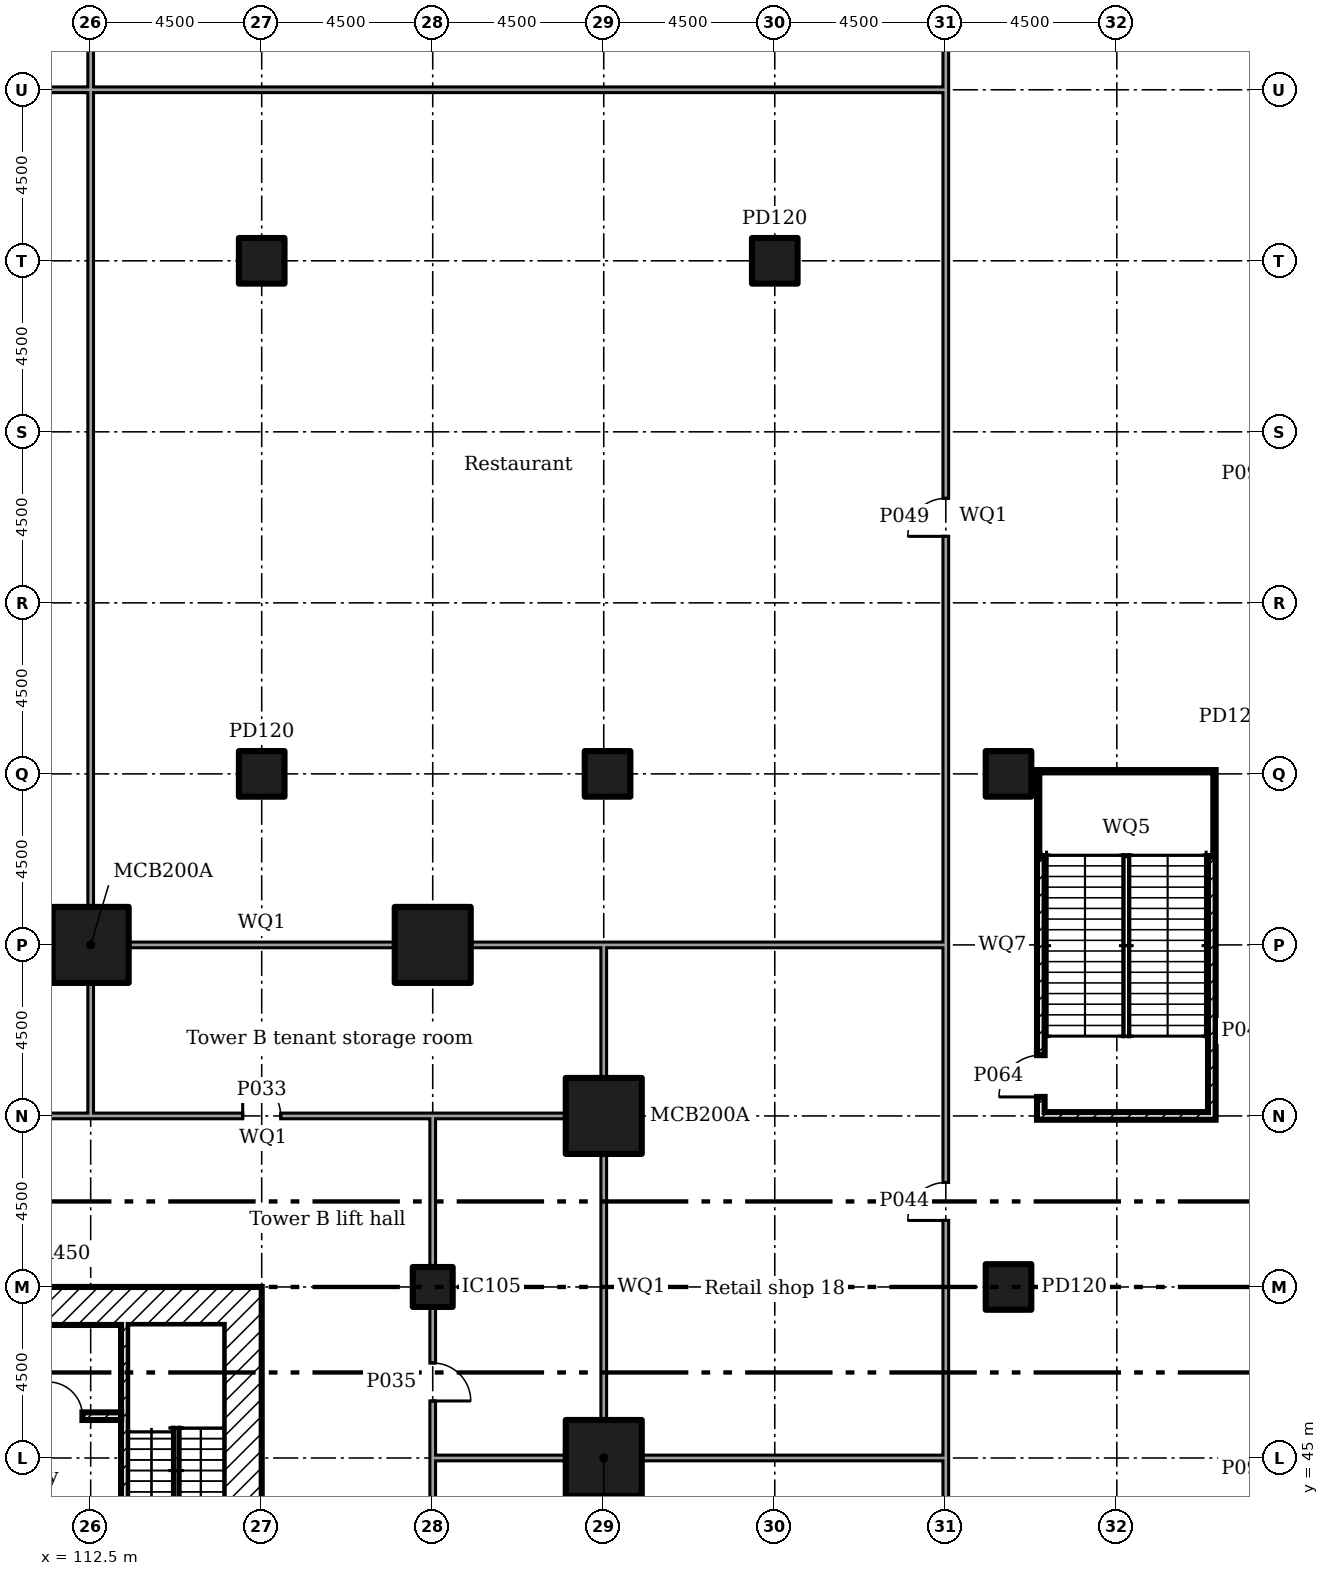
"""IFC4 building model, lengths in metres.
Left out: names, types, materials, properties, quantities, classifications, styles, units other than length and angle.
Written with IfcOpenShell. Run it as: python <this file> out.ifc"""

import sys

from ifc_helpers import new_model, si_unit, direction, frame, frame_2d, origin, origin_2d, place, context, subcontext, project, spatial, rectangle, extrude, element, fill, save


model = new_model("IFC4")
c1 = context("Model", 3, precision=1e-05, world=origin(), true_north=direction((0.0, 1.0)))
c2 = subcontext(c1, "Body", "Model", "MODEL_VIEW")
j1 = project(units=[si_unit("LENGTHUNIT", "METRE"), si_unit("PLANEANGLEUNIT", "RADIAN")], contexts=[c1])
p1 = place(None, origin())
s1 = spatial("IfcSite", under=j1, at=p1, CompositionType="ELEMENT")
p2 = place(p1, origin())
s2 = spatial("IfcBuilding", under=s1, at=p2, CompositionType="ELEMENT")
p3 = place(p2, origin())
s3 = spatial("IfcBuildingStorey", under=s2, at=p3, CompositionType="ELEMENT", Elevation=0.0)
for number, where in (
    (1, (112.5, 58.5, 0.0)),
    (2, (121.5, 58.5, 0.0)),
    (3, (126.0, 45.0, 0.0)),
    (4, (126.0, 54.0, 0.0)),
):
    element("IfcColumn", number, at=place(p3, frame(where)), inside=s3, PredefinedType="COLUMN", context=c2, shape_type="SweptSolid", body=[
        extrude(rectangle(XDim=2.0, YDim=2.0, at=origin_2d()), origin(), (0.0, 0.0, 1.0), 6.0),
    ])
p4 = place(p3, frame((121.5, 49.5, 0.0)))
e5 = element("IfcColumn", 5, at=p4, inside=s3, PredefinedType="COLUMN", context=c2, shape_type="SweptSolid", body=[
    extrude(rectangle(XDim=1.05, YDim=1.05, at=origin_2d()), origin(), (0.0, 0.0, 1.0), 6.0),
])
for number, where in (
    (6, (117.0, 63.0, 0.0)),
    (7, (117.0, 76.5, 0.0)),
    (8, (126.1, 63.0, 0.0)),
    (9, (130.5, 76.5, 0.0)),
    (10, (136.65, 49.5, 0.0)),
    (11, (136.65, 63.0, 0.0)),
):
    element("IfcColumn", number, at=place(p3, frame(where)), inside=s3, PredefinedType="COLUMN", context=c2, shape_type="SweptSolid", body=[
        extrude(rectangle(XDim=1.2, YDim=1.2, at=origin_2d()), origin(), (0.0, 0.0, 1.0), 6.0),
    ])
p5 = place(p3, frame((116.5, 36.0, 0.0), z_axis=(0.0, 0.0, 1.0), x_axis=(0.0, 1.0, 0.0)))
e12 = element("IfcWall", 12, at=p5, inside=s3, PredefinedType="SHEAR", context=c2, shape_type="SweptSolid", body=[
    extrude(rectangle(XDim=13.5, YDim=1.0, at=frame_2d((6.75, 0.0))), origin(), (0.0, 0.0, 1.0), 5.5),
])
p6 = place(p5, frame((3.7, 0.0, 0.0)))
e13 = element("IfcOpeningElement", 13, at=p6, cuts=e12, PredefinedType="OPENING", context=c2, shape_type="SweptSolid", body=[
    extrude(rectangle(XDim=1.2, YDim=2.1, at=frame_2d((0.6, 1.05))), frame((0.0, 0.51, 0.0), z_axis=(0.0, -1.0, 0.0), x_axis=(1.0, 0.0, 0.0)), (0.0, 0.0, 1.0), 1.02),
])
p7 = place(p5, frame((6.275, 0.0, 0.0)))
e14 = element("IfcOpeningElement", 14, at=p7, cuts=e12, PredefinedType="OPENING", context=c2, shape_type="SweptSolid", body=[
    extrude(rectangle(XDim=1.0, YDim=2.1, at=frame_2d((0.5, 1.05))), frame((0.0, 0.51, 0.0), z_axis=(0.0, -1.0, 0.0), x_axis=(1.0, 0.0, 0.0)), (0.0, 0.0, 1.0), 1.02),
])
p8 = place(p3, frame((104.5, 49.0, 0.0)))
e15 = element("IfcWall", 15, at=p8, inside=s3, PredefinedType="SHEAR", context=c2, shape_type="SweptSolid", body=[
    extrude(rectangle(XDim=11.5, YDim=1.0, at=frame_2d((5.75, 0.0))), origin(), (0.0, 0.0, 1.0), 5.5),
])
p9 = place(p3, frame((110.467, 46.1, 0.0)))
e16 = element("IfcWall", 16, at=p9, inside=s3, PredefinedType="SHEAR", context=c2, shape_type="SweptSolid", body=[
    extrude(rectangle(XDim=2.833, YDim=0.2, at=frame_2d((1.417, 0.0))), origin(), (0.0, 0.0, 1.0), 5.5),
])
p10 = place(p9, frame((0.917, 0.0, 0.0)))
e17 = element("IfcOpeningElement", 17, at=p10, cuts=e16, PredefinedType="OPENING", context=c2, shape_type="SweptSolid", body=[
    extrude(rectangle(XDim=0.9, YDim=2.1, at=frame_2d((0.45, 1.05))), frame((0.0, 0.11, 0.0), z_axis=(0.0, -1.0, 0.0), x_axis=(1.0, 0.0, 0.0)), (0.0, 0.0, 1.0), 0.22),
])
p11 = place(p3, frame((113.4, 41.1, 0.0), z_axis=(0.0, 0.0, 1.0), x_axis=(0.0, 1.0, 0.0)))
e18 = element("IfcWall", 18, at=p11, inside=s3, PredefinedType="SHEAR", context=c2, shape_type="SweptSolid", body=[
    extrude(rectangle(XDim=7.4, YDim=0.2, at=frame_2d((3.7, 0.0))), origin(), (0.0, 0.0, 1.0), 5.5),
])
p12 = place(p3, frame((104.02, 54.0, 0.0)))
e19 = element("IfcWall", 19, at=p12, inside=s3, PredefinedType="PARTITIONING", context=c2, shape_type="SweptSolid", body=[
    extrude(rectangle(XDim=8.555, YDim=0.15, at=frame_2d((4.277, 0.0))), origin(), (0.0, 0.0, 1.0), 5.55),
])
p13 = place(p12, frame((3.75, 0.0, 0.0)))
e20 = element("IfcOpeningElement", 20, at=p13, cuts=e19, PredefinedType="OPENING", context=c2, shape_type="SweptSolid", body=[
    extrude(rectangle(XDim=1.0, YDim=2.1, at=frame_2d((0.5, 1.05))), frame((0.0, 0.085, 0.0), z_axis=(0.0, -1.0, 0.0), x_axis=(1.0, 0.0, 0.0)), (0.0, 0.0, 1.0), 0.17),
])
p14 = place(p3, frame((112.5, 54.0, 0.0)))
e21 = element("IfcWall", 21, at=p14, inside=s3, PredefinedType="PARTITIONING", context=c2, shape_type="SweptSolid", body=[
    extrude(rectangle(XDim=9.075, YDim=0.15, at=frame_2d((4.538, 0.0))), origin(), (0.0, 0.0, 1.0), 5.55),
])
p15 = place(p14, frame((4.0, 0.0, 0.0)))
e22 = element("IfcOpeningElement", 22, at=p15, cuts=e21, PredefinedType="OPENING", context=c2, shape_type="SweptSolid", body=[
    extrude(rectangle(XDim=1.0, YDim=2.1, at=frame_2d((0.5, 1.05))), frame((0.0, 0.085, 0.0), z_axis=(0.0, -1.0, 0.0), x_axis=(1.0, 0.0, 0.0)), (0.0, 0.0, 1.0), 0.17),
])
p16 = place(p3, frame((121.5, 40.5, 0.0), z_axis=(0.0, 0.0, 1.0), x_axis=(0.0, 1.0, 0.0)))
e23 = element("IfcWall", 23, at=p16, inside=s3, PredefinedType="PARTITIONING", context=c2, shape_type="SweptSolid", body=[
    extrude(rectangle(XDim=4.575, YDim=0.15, at=frame_2d((2.288, 0.0))), origin(), (0.0, 0.0, 1.0), 5.55),
])
p17 = place(p16, frame((1.35, 0.0, 0.0)))
e24 = element("IfcOpeningElement", 24, at=p17, cuts=e23, PredefinedType="OPENING", context=c2, shape_type="SweptSolid", body=[
    extrude(rectangle(XDim=1.8, YDim=2.1, at=frame_2d((0.9, 1.05))), frame((0.0, 0.085, 0.0), z_axis=(0.0, -1.0, 0.0), x_axis=(1.0, 0.0, 0.0)), (0.0, 0.0, 1.0), 0.17),
])
p18 = place(p3, frame((121.5, 45.0, 0.0), z_axis=(0.0, 0.0, 1.0), x_axis=(0.0, 1.0, 0.0)))
e25 = element("IfcWall", 25, at=p18, inside=s3, PredefinedType="PARTITIONING", context=c2, shape_type="SweptSolid", body=[
    extrude(rectangle(XDim=3.98, YDim=0.15, at=frame_2d((1.99, 0.0))), origin(), (0.0, 0.0, 1.0), 5.55),
])
p19 = place(p18, frame((1.5, 0.0, 0.0)))
e26 = element("IfcOpeningElement", 26, at=p19, cuts=e25, PredefinedType="OPENING", context=c2, shape_type="SweptSolid", body=[
    extrude(rectangle(XDim=1.0, YDim=2.1, at=frame_2d((0.5, 1.05))), frame((0.0, 0.085, 0.0), z_axis=(0.0, -1.0, 0.0), x_axis=(1.0, 0.0, 0.0)), (0.0, 0.0, 1.0), 0.17),
])
p20 = place(p3, frame((121.5, 50.02, 0.0), z_axis=(0.0, 0.0, 1.0), x_axis=(0.0, 1.0, 0.0)))
e27 = element("IfcWall", 27, at=p20, inside=s3, PredefinedType="PARTITIONING", context=c2, shape_type="SweptSolid", body=[
    extrude(rectangle(XDim=3.905, YDim=0.15, at=frame_2d((1.953, 0.0))), origin(), (0.0, 0.0, 1.0), 5.55),
])
p21 = place(p3, frame((112.5, 54.075, 0.0), z_axis=(0.0, 0.0, 1.0), x_axis=(0.0, 1.0, 0.0)))
e28 = element("IfcWall", 28, at=p21, inside=s3, PredefinedType="PARTITIONING", context=c2, shape_type="SweptSolid", body=[
    extrude(rectangle(XDim=3.43, YDim=0.15, at=frame_2d((1.715, 0.0))), origin(), (0.0, 0.0, 1.0), 5.55),
])
p22 = place(p3, frame((99.995, 58.5, 0.0)))
e29 = element("IfcWall", 29, at=p22, inside=s3, PredefinedType="PARTITIONING", context=c2, shape_type="SweptSolid", body=[
    extrude(rectangle(XDim=11.51, YDim=0.15, at=frame_2d((5.755, 0.0))), origin(), (0.0, 0.0, 1.0), 5.55),
])
p23 = place(p3, frame((121.5, 54.0, 0.0)))
e30 = element("IfcWall", 30, at=p23, inside=s3, PredefinedType="PARTITIONING", context=c2, shape_type="SweptSolid", body=[
    extrude(rectangle(XDim=3.505, YDim=0.15, at=frame_2d((1.752, 0.0))), origin(), (0.0, 0.0, 1.0), 5.55),
])
p24 = place(p3, frame((126.0, 54.995, 0.0), z_axis=(0.0, 0.0, 1.0), x_axis=(0.0, 1.0, 0.0)))
e31 = element("IfcWall", 31, at=p24, inside=s3, PredefinedType="PARTITIONING", context=c2, shape_type="SweptSolid", body=[
    extrude(rectangle(XDim=3.58, YDim=0.15, at=frame_2d((1.79, 0.0))), origin(), (0.0, 0.0, 1.0), 5.55),
])
p25 = place(p3, frame((113.495, 58.5, 0.0)))
e32 = element("IfcWall", 32, at=p25, inside=s3, PredefinedType="PARTITIONING", context=c2, shape_type="SweptSolid", body=[
    extrude(rectangle(XDim=7.01, YDim=0.15, at=frame_2d((3.505, 0.0))), origin(), (0.0, 0.0, 1.0), 5.55),
])
for number, where in (
    (33, (122.495, 58.5, 0.0)),
    (34, (121.575, 45.0, 0.0)),
):
    element("IfcWall", number, at=place(p3, frame(where)), inside=s3, PredefinedType="PARTITIONING", context=c2, shape_type="SweptSolid", body=[
        extrude(rectangle(XDim=3.43, YDim=0.15, at=frame_2d((1.715, 0.0))), origin(), (0.0, 0.0, 1.0), 5.55),
    ])
p26 = place(p3, frame((126.995, 45.0, 0.0)))
e35 = element("IfcWall", 35, at=p26, inside=s3, PredefinedType="PARTITIONING", context=c2, shape_type="SweptSolid", body=[
    extrude(rectangle(XDim=8.08, YDim=0.15, at=frame_2d((4.04, 0.0))), origin(), (0.0, 0.0, 1.0), 5.55),
])
p27 = place(p3, frame((135.0, 40.5, 0.0), z_axis=(0.0, 0.0, 1.0), x_axis=(0.0, 1.0, 0.0)))
e36 = element("IfcWall", 36, at=p27, inside=s3, PredefinedType="PARTITIONING", context=c2, shape_type="SweptSolid", body=[
    extrude(rectangle(XDim=4.425, YDim=0.15, at=frame_2d((2.212, 0.0))), origin(), (0.0, 0.0, 1.0), 5.55),
])
p28 = place(p27, frame((1.35, 0.0, 0.0)))
e37 = element("IfcOpeningElement", 37, at=p28, cuts=e36, PredefinedType="OPENING", context=c2, shape_type="SweptSolid", body=[
    extrude(rectangle(XDim=1.8, YDim=2.1, at=frame_2d((0.9, 1.05))), frame((0.0, 0.085, 0.0), z_axis=(0.0, -1.0, 0.0), x_axis=(1.0, 0.0, 0.0)), (0.0, 0.0, 1.0), 0.17),
])
p29 = place(p3, frame((126.0, 45.995, 0.0), z_axis=(0.0, 0.0, 1.0), x_axis=(0.0, 1.0, 0.0)))
e38 = element("IfcWall", 38, at=p29, inside=s3, PredefinedType="PARTITIONING", context=c2, shape_type="SweptSolid", body=[
    extrude(rectangle(XDim=7.01, YDim=0.15, at=frame_2d((3.505, 0.0))), origin(), (0.0, 0.0, 1.0), 5.55),
])
p30 = place(p3, frame((135.0, 45.0, 0.0), z_axis=(0.0, 0.0, 1.0), x_axis=(0.0, 1.0, 0.0)))
e39 = element("IfcWall", 39, at=p30, inside=s3, PredefinedType="PARTITIONING", context=c2, shape_type="SweptSolid", body=[
    extrude(rectangle(XDim=13.575, YDim=0.15, at=frame_2d((6.788, 0.0))), origin(), (0.0, 0.0, 1.0), 5.55),
])
p31 = place(p30, frame((6.25, 0.0, 0.0)))
e40 = element("IfcOpeningElement", 40, at=p31, cuts=e39, PredefinedType="OPENING", context=c2, shape_type="SweptSolid", body=[
    extrude(rectangle(XDim=1.0, YDim=2.1, at=frame_2d((0.5, 1.05))), frame((0.0, 0.085, 0.0), z_axis=(0.0, -1.0, 0.0), x_axis=(1.0, 0.0, 0.0)), (0.0, 0.0, 1.0), 0.17),
])
p32 = place(p3, frame((126.0, 58.5, 0.0)))
e41 = element("IfcWall", 41, at=p32, inside=s3, PredefinedType="PARTITIONING", context=c2, shape_type="SweptSolid", body=[
    extrude(rectangle(XDim=8.925, YDim=0.15, at=frame_2d((4.462, 0.0))), origin(), (0.0, 0.0, 1.0), 5.55),
])
p33 = place(p3, frame((135.0, 58.5, 0.0), z_axis=(0.0, 0.0, 1.0), x_axis=(0.0, 1.0, 0.0)))
e42 = element("IfcWall", 42, at=p33, inside=s3, PredefinedType="PARTITIONING", context=c2, shape_type="SweptSolid", body=[
    extrude(rectangle(XDim=22.575, YDim=0.15, at=frame_2d((11.288, 0.0))), origin(), (0.0, 0.0, 1.0), 5.55),
])
p34 = place(p33, frame((10.75, 0.0, 0.0)))
e43 = element("IfcOpeningElement", 43, at=p34, cuts=e42, PredefinedType="OPENING", context=c2, shape_type="SweptSolid", body=[
    extrude(rectangle(XDim=1.0, YDim=2.1, at=frame_2d((0.5, 1.05))), frame((0.0, 0.085, 0.0), z_axis=(0.0, -1.0, 0.0), x_axis=(1.0, 0.0, 0.0)), (0.0, 0.0, 1.0), 0.17),
])
p35 = place(p3, frame((135.0, 81.0, 0.0), z_axis=(0.0, 0.0, 1.0), x_axis=(0.0, 1.0, 0.0)))
e44 = element("IfcWall", 44, at=p35, inside=s3, PredefinedType="PARTITIONING", context=c2, shape_type="SweptSolid", body=[
    extrude(rectangle(XDim=4.575, YDim=0.15, at=frame_2d((2.288, 0.0))), origin(), (0.0, 0.0, 1.0), 5.55),
])
p36 = place(p35, frame((1.35, 0.0, 0.0)))
e45 = element("IfcOpeningElement", 45, at=p36, cuts=e44, PredefinedType="OPENING", context=c2, shape_type="SweptSolid", body=[
    extrude(rectangle(XDim=1.8, YDim=2.1, at=frame_2d((0.9, 1.05))), frame((0.0, 0.085, 0.0), z_axis=(0.0, -1.0, 0.0), x_axis=(1.0, 0.0, 0.0)), (0.0, 0.0, 1.0), 0.17),
])
p37 = place(p3, frame((137.5, 53.9, 0.0), z_axis=(0.0, 0.0, 1.0), x_axis=(0.0, 1.0, 0.0)))
e46 = element("IfcWall", 46, at=p37, inside=s3, PredefinedType="SOLIDWALL", context=c2, shape_type="SweptSolid", body=[
    extrude(rectangle(XDim=9.2, YDim=0.2, at=frame_2d((4.6, 0.0))), origin(), (0.0, 0.0, 1.0), 5.55),
])
p38 = place(p37, frame((0.6, 0.0, 0.0)))
e47 = element("IfcOpeningElement", 47, at=p38, cuts=e46, PredefinedType="OPENING", context=c2, shape_type="SweptSolid", body=[
    extrude(rectangle(XDim=1.1, YDim=2.1, at=frame_2d((0.55, 1.05))), frame((0.0, 0.11, 0.0), z_axis=(0.0, -1.0, 0.0), x_axis=(1.0, 0.0, 0.0)), (0.0, 0.0, 1.0), 0.22),
])
p39 = place(p3, frame((142.0, 53.9, 0.0), z_axis=(0.0, 0.0, 1.0), x_axis=(0.0, 1.0, 0.0)))
e48 = element("IfcWall", 48, at=p39, inside=s3, PredefinedType="SOLIDWALL", context=c2, shape_type="SweptSolid", body=[
    extrude(rectangle(XDim=9.2, YDim=0.2, at=frame_2d((4.6, 0.0))), origin(), (0.0, 0.0, 1.0), 5.55),
])
for number, where in (
    (49, (137.6, 54.0, 0.0)),
    (50, (137.6, 63.0, 0.0)),
):
    element("IfcWall", number, at=place(p3, frame(where)), inside=s3, PredefinedType="SOLIDWALL", context=c2, shape_type="SweptSolid", body=[
        extrude(rectangle(XDim=4.3, YDim=0.2, at=frame_2d((2.15, 0.0))), origin(), (0.0, 0.0, 1.0), 5.55),
    ])
p40 = place(p3, frame((112.5, 59.495, 0.0), z_axis=(0.0, 0.0, 1.0), x_axis=(0.0, 1.0, 0.0)))
e51 = element("IfcWall", 51, at=p40, inside=s3, PredefinedType="PARTITIONING", context=c2, shape_type="SweptSolid", body=[
    extrude(rectangle(XDim=21.58, YDim=0.15, at=frame_2d((10.79, 0.0))), origin(), (0.0, 0.0, 1.0), 5.55),
])
p41 = place(p3, frame((94.575, 81.0, 0.0)))
e52 = element("IfcWall", 52, at=p41, inside=s3, PredefinedType="PARTITIONING", context=c2, shape_type="SweptSolid", body=[
    extrude(rectangle(XDim=17.85, YDim=0.15, at=frame_2d((8.925, 0.0))), origin(), (0.0, 0.0, 1.0), 5.55),
])
p42 = place(p3, frame((112.425, 81.0, 0.0)))
e53 = element("IfcWall", 53, at=p42, inside=s3, PredefinedType="PARTITIONING", context=c2, shape_type="SweptSolid", body=[
    extrude(rectangle(XDim=22.5, YDim=0.15, at=frame_2d((11.25, 0.0))), origin(), (0.0, 0.0, 1.0), 5.55),
])
p43 = place(p3, frame((112.5, 81.075, 0.0), z_axis=(0.0, 0.0, 1.0), x_axis=(0.0, 1.0, 0.0)))
e54 = element("IfcWall", 54, at=p43, inside=s3, PredefinedType="PARTITIONING", context=c2, shape_type="SweptSolid", body=[
    extrude(rectangle(XDim=4.5, YDim=0.15, at=frame_2d((2.25, 0.0))), origin(), (0.0, 0.0, 1.0), 5.55),
])
p44 = place(p43, frame((1.275, 0.0, 0.0)))
e55 = element("IfcOpeningElement", 55, at=p44, cuts=e54, PredefinedType="OPENING", context=c2, shape_type="SweptSolid", body=[
    extrude(rectangle(XDim=1.8, YDim=2.1, at=frame_2d((0.9, 1.05))), frame((0.0, 0.085, 0.0), z_axis=(0.0, -1.0, 0.0), x_axis=(1.0, 0.0, 0.0)), (0.0, 0.0, 1.0), 0.17),
])
for number, where in (
    (56, (137.6, 60.96, 0.0)),
    (57, (137.6, 62.3, 0.0)),
):
    element("IfcWall", number, at=place(p3, frame(where)), inside=s3, PredefinedType="SOLIDWALL", context=c2, shape_type="SweptSolid", body=[
        extrude(rectangle(XDim=4.3, YDim=0.2, at=frame_2d((2.15, 0.0))), origin(), (0.0, 0.0, 1.0), 2.8),
    ])
p45 = place(p10, origin())
e58 = element("IfcDoor", 58, at=p45, inside=s3, OperationType="SINGLE_SWING_RIGHT", PredefinedType="DOOR", context=c2, shape_type="SweptSolid", body=[
    extrude(rectangle(XDim=0.9, YDim=2.1, at=frame_2d((0.45, 1.05))), frame((0.0, 0.025, 0.0), z_axis=(0.0, -1.0, 0.0), x_axis=(1.0, 0.0, 0.0)), (0.0, 0.0, 1.0), 0.05),
])
fill(e17, e58)
p46 = place(p15, origin())
e59 = element("IfcDoor", 59, at=p46, inside=s3, OperationType="SINGLE_SWING_RIGHT", PredefinedType="DOOR", context=c2, shape_type="SweptSolid", body=[
    extrude(rectangle(XDim=1.0, YDim=2.1, at=frame_2d((0.5, 1.05))), frame((0.0, 0.025, 0.0), z_axis=(0.0, -1.0, 0.0), x_axis=(1.0, 0.0, 0.0)), (0.0, 0.0, 1.0), 0.05),
])
fill(e22, e59)
p47 = place(p19, frame((1.0, 0.0, 0.0), x_axis=(-1.0, 0.0, 0.0)))
e60 = element("IfcDoor", 60, at=p47, inside=s3, OperationType="SINGLE_SWING_LEFT", PredefinedType="DOOR", context=c2, shape_type="SweptSolid", body=[
    extrude(rectangle(XDim=1.0, YDim=2.1, at=frame_2d((0.5, 1.05))), frame((0.0, 0.025, 0.0), z_axis=(0.0, -1.0, 0.0), x_axis=(1.0, 0.0, 0.0)), (0.0, 0.0, 1.0), 0.05),
])
fill(e26, e60)
p48 = place(p31, origin())
e61 = element("IfcDoor", 61, at=p48, inside=s3, OperationType="SINGLE_SWING_RIGHT", PredefinedType="DOOR", context=c2, shape_type="SweptSolid", body=[
    extrude(rectangle(XDim=1.0, YDim=2.1, at=frame_2d((0.5, 1.05))), frame((0.0, 0.025, 0.0), z_axis=(0.0, -1.0, 0.0), x_axis=(1.0, 0.0, 0.0)), (0.0, 0.0, 1.0), 0.05),
])
fill(e40, e61)
p49 = place(p34, origin())
e62 = element("IfcDoor", 62, at=p49, inside=s3, OperationType="SINGLE_SWING_RIGHT", PredefinedType="DOOR", context=c2, shape_type="SweptSolid", body=[
    extrude(rectangle(XDim=1.0, YDim=2.1, at=frame_2d((0.5, 1.05))), frame((0.0, 0.025, 0.0), z_axis=(0.0, -1.0, 0.0), x_axis=(1.0, 0.0, 0.0)), (0.0, 0.0, 1.0), 0.05),
])
fill(e43, e62)
p50 = place(p38, origin())
e63 = element("IfcDoor", 63, at=p50, inside=s3, OperationType="SINGLE_SWING_RIGHT", PredefinedType="DOOR", context=c2, shape_type="SweptSolid", body=[
    extrude(rectangle(XDim=1.1, YDim=2.1, at=frame_2d((0.55, 1.05))), frame((0.0, 0.025, 0.0), z_axis=(0.0, -1.0, 0.0), x_axis=(1.0, 0.0, 0.0)), (0.0, 0.0, 1.0), 0.05),
])
fill(e47, e63)
save(model, sys.argv[1])
